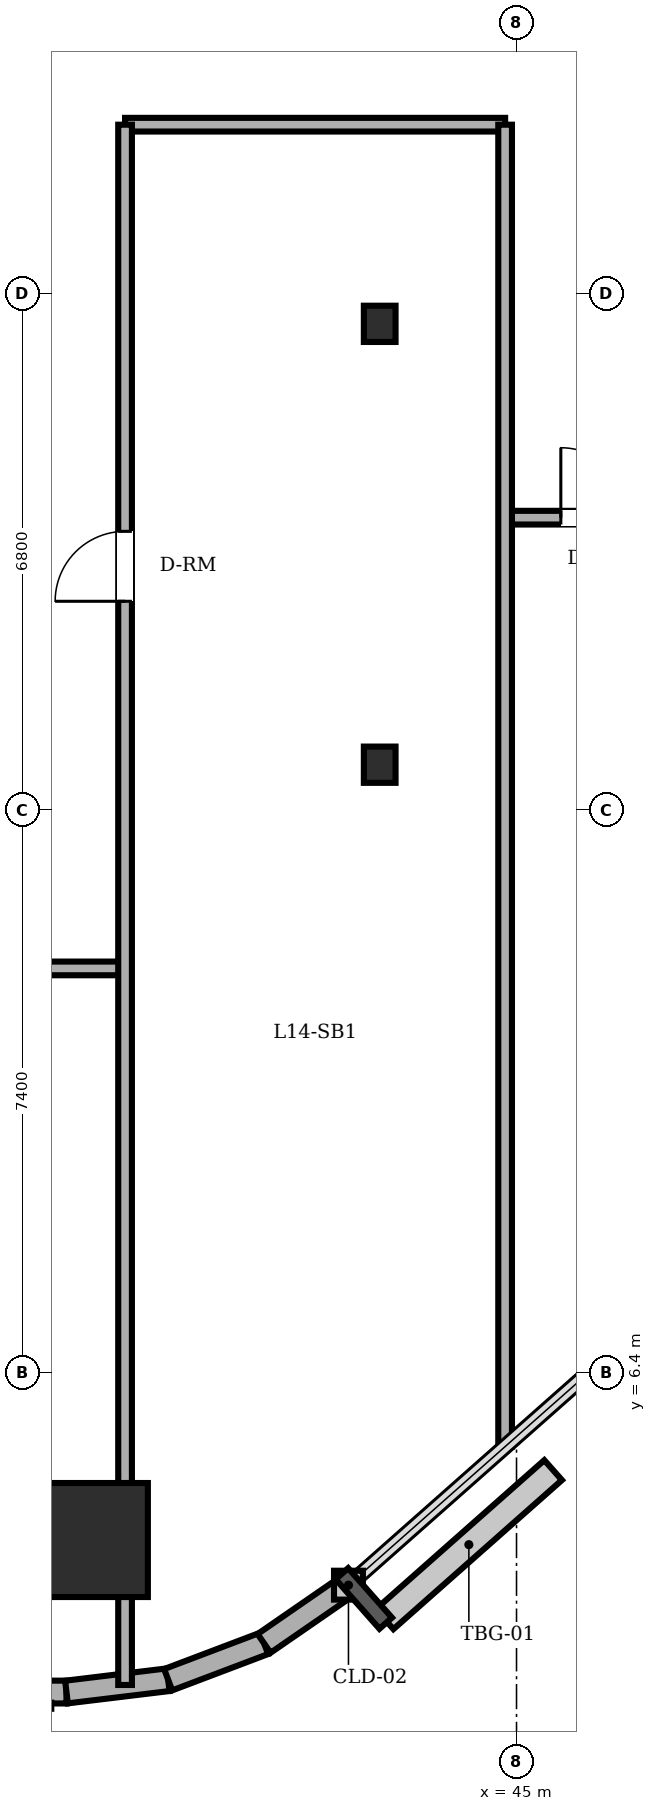
"""IFC4 building model, lengths in metres.
Left out: names, types, materials, properties, quantities, classifications, styles, units other than length and angle.
Written with IfcOpenShell. Run it as: python <this file> out.ifc"""

import sys

from ifc_helpers import new_model, si_unit, direction, frame, frame_2d, origin, origin_2d, place, context, subcontext, project, spatial, rectangle, circle, i_section, extrude, element, fill, save


model = new_model("IFC4")
c1 = context("Model", 3, precision=1e-05, world=origin(), true_north=direction((0.0, 1.0)))
c2 = subcontext(c1, "Body", "Model", "MODEL_VIEW")
j1 = project(units=[si_unit("LENGTHUNIT", "METRE"), si_unit("PLANEANGLEUNIT", "RADIAN")], contexts=[c1])
p1 = place(None, origin())
s1 = spatial("IfcSite", under=j1, at=p1, CompositionType="ELEMENT")
p2 = place(p1, origin())
s2 = spatial("IfcBuilding", under=s1, at=p2, CompositionType="ELEMENT")
p3 = place(p2, frame((0.0, 0.0, 54.0)))
s3 = spatial("IfcBuildingStorey", under=s2, at=p3, CompositionType="ELEMENT", Elevation=54.0)
p4 = place(p3, frame((39.4, 4.2, 0.0), z_axis=(0.0, 0.0, 1.0), x_axis=(1.0, 0.0, 0.0)))
e1 = element("IfcColumn", 1, at=p4, inside=s3, PredefinedType="COLUMN", context=c2, shape_type="SweptSolid", body=[
    extrude(circle(Radius=0.75, at=origin_2d()), origin(), (0.0, 0.0, 1.0), 3.6),
])
for number, where, z_axis, x_axis in (
    (2, (43.2, 14.4, 0.0), (0.0, 0.0, 1.0), (1.0, 0.0, 0.0)),
    (3, (43.2, 20.2, 0.0), (0.0, 0.0, 1.0), (1.0, 0.0, 0.0)),
):
    element("IfcColumn", number, at=place(p3, frame(where, z_axis=z_axis, x_axis=x_axis)), inside=s3, PredefinedType="COLUMN", context=c2, shape_type="SweptSolid", body=[
        extrude(i_section(OverallWidth=0.417, OverallDepth=0.477, WebThickness=0.036, FlangeThickness=0.057, FilletRadius=0.015, at=origin_2d()), origin(), (0.0, 0.0, 1.0), 3.6),
    ])
p5 = place(p3, frame((9.0, 2.2, 0.0), z_axis=(0.0, 0.0, 1.0), x_axis=(1.0, 0.0, 0.0)))
e4 = element("IfcWall", 4, at=p5, inside=s3, PredefinedType="SOLIDWALL", context=c2, shape_type="SweptSolid", body=[
    extrude(rectangle(XDim=30.079, YDim=0.3, at=frame_2d((15.04, 0.0))), origin(), (0.0, 0.0, 1.0), 3.4),
])
p6 = place(p5, frame((8.225, 0.0, 0.0)))
e5 = element("IfcOpeningElement", 5, at=p6, cuts=e4, PredefinedType="OPENING", context=c2, shape_type="SweptSolid", body=[
    extrude(rectangle(XDim=0.95, YDim=2.2, at=frame_2d((0.475, 1.1))), frame((0.0, 0.16, 0.0), z_axis=(0.0, -1.0, 0.0), x_axis=(1.0, 0.0, 0.0)), (0.0, 0.0, 1.0), 0.32),
])
p7 = place(p5, frame((4.067, 0.0, 0.85)))
e6 = element("IfcOpeningElement", 6, at=p7, cuts=e4, PredefinedType="OPENING", context=c2, shape_type="SweptSolid", body=[
    extrude(rectangle(XDim=1.8, YDim=1.55, at=frame_2d((0.9, 0.775))), frame((0.0, 0.16, 0.0), z_axis=(0.0, -1.0, 0.0), x_axis=(1.0, 0.0, 0.0)), (0.0, 0.0, 1.0), 0.32),
])
p8 = place(p5, frame((15.2, 0.0, 0.85)))
e7 = element("IfcOpeningElement", 7, at=p8, cuts=e4, PredefinedType="OPENING", context=c2, shape_type="SweptSolid", body=[
    extrude(rectangle(XDim=1.8, YDim=1.55, at=frame_2d((0.9, 0.775))), frame((0.0, 0.16, 0.0), z_axis=(0.0, -1.0, 0.0), x_axis=(1.0, 0.0, 0.0)), (0.0, 0.0, 1.0), 0.32),
])
p9 = place(p5, frame((21.01, 0.0, 0.85)))
e8 = element("IfcOpeningElement", 8, at=p9, cuts=e4, PredefinedType="OPENING", context=c2, shape_type="SweptSolid", body=[
    extrude(rectangle(XDim=1.8, YDim=1.55, at=frame_2d((0.9, 0.775))), frame((0.0, 0.16, 0.0), z_axis=(0.0, -1.0, 0.0), x_axis=(1.0, 0.0, 0.0)), (0.0, 0.0, 1.0), 0.32),
])
p10 = place(p5, frame((24.919, 0.0, 0.85)))
e9 = element("IfcOpeningElement", 9, at=p10, cuts=e4, PredefinedType="OPENING", context=c2, shape_type="SweptSolid", body=[
    extrude(rectangle(XDim=1.8, YDim=1.55, at=frame_2d((0.9, 0.775))), frame((0.0, 0.16, 0.0), z_axis=(0.0, -1.0, 0.0), x_axis=(1.0, 0.0, 0.0)), (0.0, 0.0, 1.0), 0.32),
])
p11 = place(p3, frame((39.079, 2.2, 0.0), z_axis=(0.0, 0.0, 1.0), x_axis=(0.992739027259, 0.120288086515, 0.0)))
e10 = element("IfcWall", 10, at=p11, inside=s3, PredefinedType="SOLIDWALL", context=c2, shape_type="SweptSolid", body=[
    extrude(rectangle(XDim=1.348, YDim=0.3, at=frame_2d((0.674, 0.0))), origin(), (0.0, 0.0, 1.0), 3.4),
])
p12 = place(p3, frame((40.417, 2.362, 0.0), z_axis=(0.0, 0.0, 1.0), x_axis=(0.935156721165, 0.354234254216, 0.0)))
e11 = element("IfcWall", 11, at=p12, inside=s3, PredefinedType="SOLIDWALL", context=c2, shape_type="SweptSolid", body=[
    extrude(rectangle(XDim=1.349, YDim=0.3, at=frame_2d((0.675, 0.0))), origin(), (0.0, 0.0, 1.0), 3.4),
])
p13 = place(p3, frame((41.679, 2.84, 0.0), z_axis=(0.0, 0.0, 1.0), x_axis=(0.823116500192, 0.567872544777, 0.0)))
e12 = element("IfcWall", 12, at=p13, inside=s3, PredefinedType="SOLIDWALL", context=c2, shape_type="SweptSolid", body=[
    extrude(rectangle(XDim=1.349, YDim=0.3, at=frame_2d((0.674, 0.0))), origin(), (0.0, 0.0, 1.0), 3.4),
])
p14 = place(p3, frame((3.4, 11.72, 0.0), z_axis=(0.0, 0.0, 1.0), x_axis=(1.0, 0.0, 0.0)))
e13 = element("IfcWall", 13, at=p14, inside=s3, PredefinedType="PARTITIONING", context=c2, shape_type="SweptSolid", body=[
    extrude(rectangle(XDim=36.45, YDim=0.18, at=frame_2d((18.225, 0.0))), origin(), (0.0, 0.0, 1.0), 3.4),
])
p15 = place(p14, frame((21.24, 0.0, 0.0)))
e14 = element("IfcOpeningElement", 14, at=p15, cuts=e13, PredefinedType="OPENING", context=c2, shape_type="SweptSolid", body=[
    extrude(rectangle(XDim=0.92, YDim=2.1, at=frame_2d((0.46, 1.05))), frame((0.0, 0.1, 0.0), z_axis=(0.0, -1.0, 0.0), x_axis=(1.0, 0.0, 0.0)), (0.0, 0.0, 1.0), 0.2),
])
p16 = place(p14, frame((10.7, 0.0, 0.0)))
e15 = element("IfcOpeningElement", 15, at=p16, cuts=e13, PredefinedType="OPENING", context=c2, shape_type="SweptSolid", body=[
    extrude(rectangle(XDim=1.0, YDim=2.15, at=frame_2d((0.5, 1.075))), frame((0.0, 0.1, 0.0), z_axis=(0.0, -1.0, 0.0), x_axis=(1.0, 0.0, 0.0)), (0.0, 0.0, 1.0), 0.2),
])
p17 = place(p14, frame((29.305, 0.0, 0.0)))
e16 = element("IfcOpeningElement", 16, at=p17, cuts=e13, PredefinedType="OPENING", context=c2, shape_type="SweptSolid", body=[
    extrude(rectangle(XDim=0.92, YDim=2.1, at=frame_2d((0.46, 1.05))), frame((0.0, 0.1, 0.0), z_axis=(0.0, -1.0, 0.0), x_axis=(1.0, 0.0, 0.0)), (0.0, 0.0, 1.0), 0.2),
])
p18 = place(p3, frame((44.85, 17.65, 0.0), z_axis=(0.0, 0.0, 1.0), x_axis=(1.0, 0.0, 0.0)))
e17 = element("IfcWall", 17, at=p18, inside=s3, PredefinedType="PARTITIONING", context=c2, shape_type="SweptSolid", body=[
    extrude(rectangle(XDim=6.75, YDim=0.18, at=frame_2d((3.375, 0.0))), origin(), (0.0, 0.0, 1.0), 3.4),
])
p19 = place(p18, frame((0.733, 0.0, 0.0)))
e18 = element("IfcOpeningElement", 18, at=p19, cuts=e17, PredefinedType="OPENING", context=c2, shape_type="SweptSolid", body=[
    extrude(rectangle(XDim=0.92, YDim=2.1, at=frame_2d((0.46, 1.05))), frame((0.0, 0.1, 0.0), z_axis=(0.0, -1.0, 0.0), x_axis=(1.0, 0.0, 0.0)), (0.0, 0.0, 1.0), 0.2),
])
p20 = place(p3, frame((39.85, 22.82, 0.0), z_axis=(0.0, 0.0, 1.0), x_axis=(1.0, 0.0, 0.0)))
e19 = element("IfcWall", 19, at=p20, inside=s3, PredefinedType="PARTITIONING", context=c2, shape_type="SweptSolid", body=[
    extrude(rectangle(XDim=5.0, YDim=0.18, at=frame_2d((2.5, 0.0))), origin(), (0.0, 0.0, 1.0), 3.4),
])
p21 = place(p3, frame((39.85, 2.293, 0.0), z_axis=(0.0, 0.0, 1.0), x_axis=(0.0, 1.0, 0.0)))
e20 = element("IfcWall", 20, at=p21, inside=s3, PredefinedType="PARTITIONING", context=c2, shape_type="SweptSolid", body=[
    extrude(rectangle(XDim=20.527, YDim=0.18, at=frame_2d((10.264, 0.0))), origin(), (0.0, 0.0, 1.0), 2.782),
])
p22 = place(p21, frame((14.257, 0.0, 0.0)))
e21 = element("IfcOpeningElement", 21, at=p22, cuts=e20, PredefinedType="OPENING", context=c2, shape_type="SweptSolid", body=[
    extrude(rectangle(XDim=0.92, YDim=2.1, at=frame_2d((0.46, 1.05))), frame((0.0, 0.1, 0.0), z_axis=(0.0, -1.0, 0.0), x_axis=(1.0, 0.0, 0.0)), (0.0, 0.0, 1.0), 0.2),
])
p23 = place(p3, frame((44.85, 5.429, 0.0), z_axis=(0.0, 0.0, 1.0), x_axis=(0.0, 1.0, 0.0)))
e22 = element("IfcWall", 22, at=p23, inside=s3, PredefinedType="PARTITIONING", context=c2, shape_type="SweptSolid", body=[
    extrude(rectangle(XDim=17.391, YDim=0.18, at=frame_2d((8.696, 0.0))), origin(), (0.0, 0.0, 1.0), 3.4),
])
p24 = place(p22, origin())
e23 = element("IfcDoor", 23, at=p24, inside=s3, OperationType="SINGLE_SWING_LEFT", PredefinedType="DOOR", context=c2, shape_type="SweptSolid", body=[
    extrude(rectangle(XDim=0.92, YDim=2.1, at=frame_2d((0.46, 1.05))), frame((0.0, 0.025, 0.0), z_axis=(0.0, -1.0, 0.0), x_axis=(1.0, 0.0, 0.0)), (0.0, 0.0, 1.0), 0.05),
])
fill(e21, e23)
p25 = place(p19, origin())
e24 = element("IfcDoor", 24, at=p25, inside=s3, OperationType="SINGLE_SWING_LEFT", PredefinedType="DOOR", context=c2, shape_type="SweptSolid", body=[
    extrude(rectangle(XDim=0.92, YDim=2.1, at=frame_2d((0.46, 1.05))), frame((0.0, 0.025, 0.0), z_axis=(0.0, -1.0, 0.0), x_axis=(1.0, 0.0, 0.0)), (0.0, 0.0, 1.0), 0.05),
])
fill(e18, e24)
save(model, sys.argv[1])
